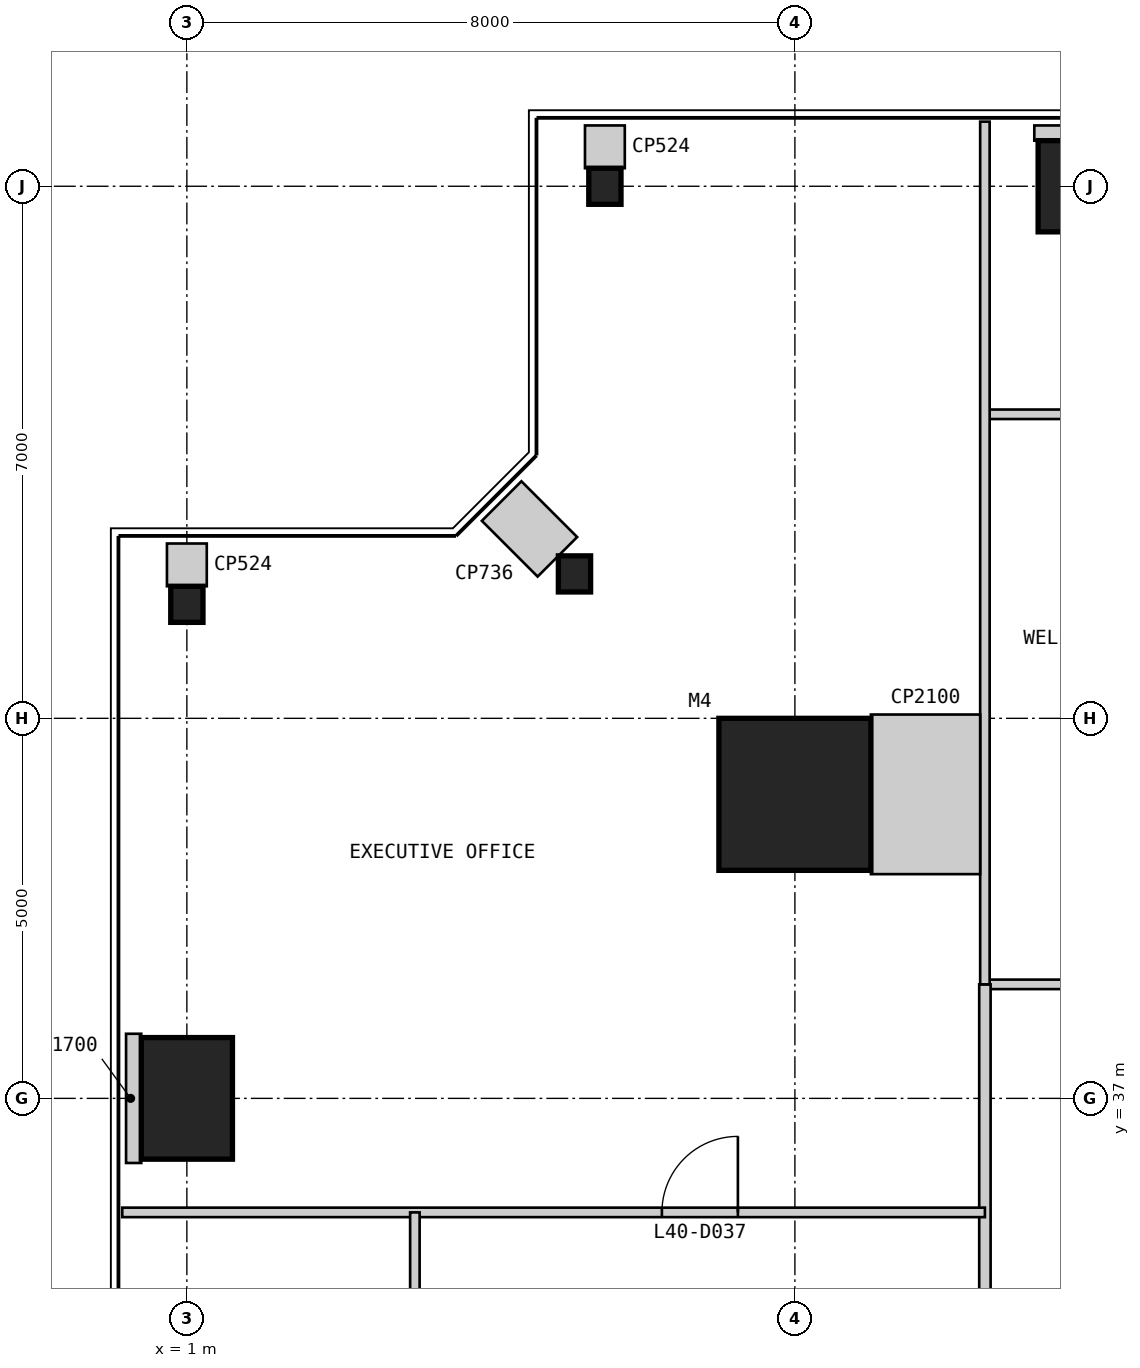
"""IFC4 building model, lengths in metres.
Left out: names, types, materials, properties, quantities, classifications, styles, units other than length and angle.
Written with IfcOpenShell. Run it as: python <this file> out.ifc"""

import sys

from ifc_helpers import new_model, si_unit, direction, frame, frame_2d, origin, origin_2d, place, context, subcontext, project, spatial, rectangle, i_section, extrude, element, fill, save


model = new_model("IFC4")
c1 = context("Model", 3, precision=1e-05, world=origin(), true_north=direction((0.0, 1.0)))
c2 = subcontext(c1, "Body", "Model", "MODEL_VIEW")
j1 = project(units=[si_unit("LENGTHUNIT", "METRE"), si_unit("PLANEANGLEUNIT", "RADIAN")], contexts=[c1])
p1 = place(None, origin())
s1 = spatial("IfcSite", under=j1, at=p1, CompositionType="ELEMENT")
p2 = place(p1, origin())
s2 = spatial("IfcBuilding", under=s1, at=p2, CompositionType="ELEMENT")
p3 = place(p2, frame((0.0, 0.0, 173.8)))
s3 = spatial("IfcBuildingStorey", under=s2, at=p3, CompositionType="ELEMENT", Elevation=173.8)
p4 = place(p3, frame((9.0, 41.0, 0.0), z_axis=(0.0, 0.0, 1.0), x_axis=(1.0, 0.0, 0.0)))
e1 = element("IfcColumn", 1, at=p4, inside=s3, PredefinedType="COLUMN", context=c2, shape_type="SweptSolid", body=[
    extrude(rectangle(XDim=2.0, YDim=2.0, at=origin_2d()), origin(), (0.0, 0.0, 1.0), 4.0),
])
p5 = place(p3, frame((13.0, 49.0, 0.0), z_axis=(0.0, 0.0, 1.0), x_axis=(1.0, 0.0, 0.0)))
e2 = element("IfcColumn", 2, at=p5, inside=s3, PredefinedType="COLUMN", context=c2, shape_type="SweptSolid", body=[
    extrude(rectangle(XDim=1.6, YDim=1.2, at=origin_2d()), origin(), (0.0, 0.0, 1.0), 4.0),
])
for number, where, z_axis, x_axis in (
    (3, (6.5, 49.0, 0.0), (0.0, 0.0, 1.0), (1.0, 0.0, 0.0)),
    (4, (6.1, 43.9, 0.0), (0.0, 0.0, 1.0), (1.0, 0.0, 0.0)),
    (5, (1.0, 43.5, 0.0), (0.0, 0.0, 1.0), (1.0, 0.0, 0.0)),
):
    element("IfcColumn", number, at=place(p3, frame(where, z_axis=z_axis, x_axis=x_axis)), inside=s3, PredefinedType="COLUMN", context=c2, shape_type="SweptSolid", body=[
        extrude(i_section(OverallWidth=0.424, OverallDepth=0.475, WebThickness=0.048, FlangeThickness=0.077, at=origin_2d()), origin(), (0.0, 0.0, 1.0), 4.0),
    ])
p6 = place(p3, frame((1.0, 37.0, 0.0), z_axis=(0.0, 0.0, 1.0), x_axis=(1.0, 0.0, 0.0)))
e6 = element("IfcColumn", 6, at=p6, inside=s3, PredefinedType="COLUMN", context=c2, shape_type="SweptSolid", body=[
    extrude(rectangle(XDim=1.2, YDim=1.6, at=origin_2d()), origin(), (0.0, 0.0, 1.0), 4.0),
])
p7 = place(p3, frame((35.5, 46.0, 0.0), z_axis=(0.0, 0.0, 1.0), x_axis=(-1.0, 0.0, 0.0)))
e7 = element("IfcWall", 7, at=p7, inside=s3, PredefinedType="PARTITIONING", context=c2, shape_type="SweptSolid", body=[
    extrude(rectangle(XDim=24.0, YDim=0.125, at=frame_2d((12.0, 0.0))), origin(), (0.0, 0.0, 1.0), 3.85),
])
p8 = place(p7, frame((16.05, 0.0, 0.0)))
e8 = element("IfcOpeningElement", 8, at=p8, cuts=e7, PredefinedType="OPENING", context=c2, shape_type="SweptSolid", body=[
    extrude(rectangle(XDim=0.9, YDim=2.2, at=frame_2d((0.45, 1.1))), frame((0.0, 0.073, 0.0), z_axis=(0.0, -1.0, 0.0), x_axis=(1.0, 0.0, 0.0)), (0.0, 0.0, 1.0), 0.145),
])
p9 = place(p7, frame((19.05, 0.0, 0.0)))
e9 = element("IfcOpeningElement", 9, at=p9, cuts=e7, PredefinedType="OPENING", context=c2, shape_type="SweptSolid", body=[
    extrude(rectangle(XDim=0.9, YDim=2.2, at=frame_2d((0.45, 1.1))), frame((0.0, 0.073, 0.0), z_axis=(0.0, -1.0, 0.0), x_axis=(1.0, 0.0, 0.0)), (0.0, 0.0, 1.0), 0.145),
])
p10 = place(p3, frame((14.5, 38.5, 0.0), z_axis=(0.0, 0.0, 1.0), x_axis=(-1.0, 0.0, 0.0)))
e10 = element("IfcWall", 10, at=p10, inside=s3, PredefinedType="PARTITIONING", context=c2, shape_type="SweptSolid", body=[
    extrude(rectangle(XDim=3.0, YDim=0.125, at=frame_2d((1.5, 0.0))), origin(), (0.0, 0.0, 1.0), 3.85),
])
p11 = place(p3, frame((11.5, 38.5, 0.0), z_axis=(0.0, 0.0, 1.0), x_axis=(0.0, -1.0, 0.0)))
e11 = element("IfcWall", 11, at=p11, inside=s3, PredefinedType="PARTITIONING", context=c2, shape_type="SweptSolid", body=[
    extrude(rectangle(XDim=27.0, YDim=0.15, at=frame_2d((13.5, 0.0))), origin(), (0.0, 0.0, 1.0), 3.85),
])
p12 = place(p11, frame((13.0, 0.0, 0.0)))
e12 = element("IfcOpeningElement", 12, at=p12, cuts=e11, PredefinedType="OPENING", context=c2, shape_type="SweptSolid", body=[
    extrude(rectangle(XDim=1.0, YDim=2.2, at=frame_2d((0.5, 1.1))), frame((0.0, 0.085, 0.0), z_axis=(0.0, -1.0, 0.0), x_axis=(1.0, 0.0, 0.0)), (0.0, 0.0, 1.0), 0.17),
])
p13 = place(p3, frame((11.5, 49.85, 0.0), z_axis=(0.0, 0.0, 1.0), x_axis=(0.0, -1.0, 0.0)))
e13 = element("IfcWall", 13, at=p13, inside=s3, PredefinedType="PARTITIONING", context=c2, shape_type="SweptSolid", body=[
    extrude(rectangle(XDim=11.35, YDim=0.125, at=frame_2d((5.675, 0.0))), origin(), (0.0, 0.0, 1.0), 3.85),
])
p14 = place(p3, frame((0.15, 35.5, 0.0), z_axis=(0.0, 0.0, 1.0), x_axis=(1.0, 0.0, 0.0)))
e14 = element("IfcWall", 14, at=p14, inside=s3, PredefinedType="PARTITIONING", context=c2, shape_type="SweptSolid", body=[
    extrude(rectangle(XDim=11.35, YDim=0.125, at=frame_2d((5.675, 0.0))), origin(), (0.0, 0.0, 1.0), 3.85),
])
p15 = place(p14, frame((7.1, 0.0, 0.0)))
e15 = element("IfcOpeningElement", 15, at=p15, cuts=e14, PredefinedType="OPENING", context=c2, shape_type="SweptSolid", body=[
    extrude(rectangle(XDim=1.0, YDim=2.2, at=frame_2d((0.5, 1.1))), frame((0.0, 0.073, 0.0), z_axis=(0.0, -1.0, 0.0), x_axis=(1.0, 0.0, 0.0)), (0.0, 0.0, 1.0), 0.145),
])
p16 = place(p3, frame((4.0, 35.5, 0.0), z_axis=(0.0, 0.0, 1.0), x_axis=(0.0, -1.0, 0.0)))
e16 = element("IfcWall", 16, at=p16, inside=s3, PredefinedType="PARTITIONING", context=c2, shape_type="SweptSolid", body=[
    extrude(rectangle(XDim=24.0, YDim=0.125, at=frame_2d((12.0, 0.0))), origin(), (0.0, 0.0, 1.0), 3.238),
])
p17 = place(p16, frame((4.05, 0.0, 0.0)))
e17 = element("IfcOpeningElement", 17, at=p17, cuts=e16, PredefinedType="OPENING", context=c2, shape_type="SweptSolid", body=[
    extrude(rectangle(XDim=0.9, YDim=2.2, at=frame_2d((0.45, 1.1))), frame((0.0, 0.073, 0.0), z_axis=(0.0, -1.0, 0.0), x_axis=(1.0, 0.0, 0.0)), (0.0, 0.0, 1.0), 0.145),
])
p18 = place(p16, frame((10.05, 0.0, 0.0)))
e18 = element("IfcOpeningElement", 18, at=p18, cuts=e16, PredefinedType="OPENING", context=c2, shape_type="SweptSolid", body=[
    extrude(rectangle(XDim=0.9, YDim=2.2, at=frame_2d((0.45, 1.1))), frame((0.0, 0.073, 0.0), z_axis=(0.0, -1.0, 0.0), x_axis=(1.0, 0.0, 0.0)), (0.0, 0.0, 1.0), 0.145),
])
p19 = place(p16, frame((16.05, 0.0, 0.0)))
e19 = element("IfcOpeningElement", 19, at=p19, cuts=e16, PredefinedType="OPENING", context=c2, shape_type="SweptSolid", body=[
    extrude(rectangle(XDim=0.9, YDim=2.2, at=frame_2d((0.45, 1.1))), frame((0.0, 0.073, 0.0), z_axis=(0.0, -1.0, 0.0), x_axis=(1.0, 0.0, 0.0)), (0.0, 0.0, 1.0), 0.145),
])
p20 = place(p16, frame((19.0, 0.0, 0.0)))
e20 = element("IfcOpeningElement", 20, at=p20, cuts=e16, PredefinedType="OPENING", context=c2, shape_type="SweptSolid", body=[
    extrude(rectangle(XDim=1.0, YDim=2.2, at=frame_2d((0.5, 1.1))), frame((0.0, 0.073, 0.0), z_axis=(0.0, -1.0, 0.0), x_axis=(1.0, 0.0, 0.0)), (0.0, 0.0, 1.0), 0.145),
])
p21 = place(p3, frame((13.0, 49.8, 0.0), z_axis=(0.0, 0.0, 1.0), x_axis=(0.0, -1.0, 0.0)))
e21 = element("IfcWall", 21, at=p21, inside=s3, PredefinedType="PARTITIONING", context=c2, shape_type="SweptSolid", body=[
    extrude(rectangle(XDim=0.2, YDim=1.7, at=frame_2d((0.1, 0.0))), origin(), (0.0, 0.0, 1.0), 3.85),
])
p22 = place(p3, frame((11.438, 41.0, 0.0), z_axis=(0.0, 0.0, 1.0), x_axis=(-1.0, 0.0, 0.0)))
e22 = element("IfcWall", 22, at=p22, inside=s3, PredefinedType="PARTITIONING", context=c2, shape_type="SweptSolid", body=[
    extrude(rectangle(XDim=1.438, YDim=2.1, at=frame_2d((0.719, 0.0))), origin(), (0.0, 0.0, 1.0), 3.85),
])
p23 = place(p3, frame((6.5, 49.8, 0.0), z_axis=(0.0, 0.0, 1.0), x_axis=(0.0, -1.0, 0.0)))
e23 = element("IfcWall", 23, at=p23, inside=s3, PredefinedType="PARTITIONING", context=c2, shape_type="SweptSolid", body=[
    extrude(rectangle(XDim=0.562, YDim=0.524, at=frame_2d((0.281, 0.0))), origin(), (0.0, 0.0, 1.0), 3.85),
])
p24 = place(p3, frame((5.141, 44.859, 0.0), z_axis=(0.0, 0.0, 1.0), x_axis=(0.707106781187, -0.707106781187, 0.0)))
e24 = element("IfcWall", 24, at=p24, inside=s3, PredefinedType="PARTITIONING", context=c2, shape_type="SweptSolid", body=[
    extrude(rectangle(XDim=1.038, YDim=0.736, at=frame_2d((0.519, 0.0))), origin(), (0.0, 0.0, 1.0), 3.85),
])
p25 = place(p3, frame((1.0, 44.3, 0.0), z_axis=(0.0, 0.0, 1.0), x_axis=(0.0, -1.0, 0.0)))
e25 = element("IfcWall", 25, at=p25, inside=s3, PredefinedType="PARTITIONING", context=c2, shape_type="SweptSolid", body=[
    extrude(rectangle(XDim=0.562, YDim=0.524, at=frame_2d((0.281, 0.0))), origin(), (0.0, 0.0, 1.0), 3.85),
])
p26 = place(p3, frame((0.2, 37.0, 0.0), z_axis=(0.0, 0.0, 1.0), x_axis=(1.0, 0.0, 0.0)))
e26 = element("IfcWall", 26, at=p26, inside=s3, PredefinedType="PARTITIONING", context=c2, shape_type="SweptSolid", body=[
    extrude(rectangle(XDim=0.2, YDim=1.7, at=frame_2d((0.1, 0.0))), origin(), (0.0, 0.0, 1.0), 3.85),
])
p27 = place(p15, origin())
e27 = element("IfcDoor", 27, at=p27, inside=s3, OperationType="SINGLE_SWING_RIGHT", PredefinedType="DOOR", context=c2, shape_type="SweptSolid", body=[
    extrude(rectangle(XDim=1.0, YDim=2.2, at=frame_2d((0.5, 1.1))), frame((0.0, 0.025, 0.0), z_axis=(0.0, -1.0, 0.0), x_axis=(1.0, 0.0, 0.0)), (0.0, 0.0, 1.0), 0.05),
])
fill(e15, e27)
save(model, sys.argv[1])
